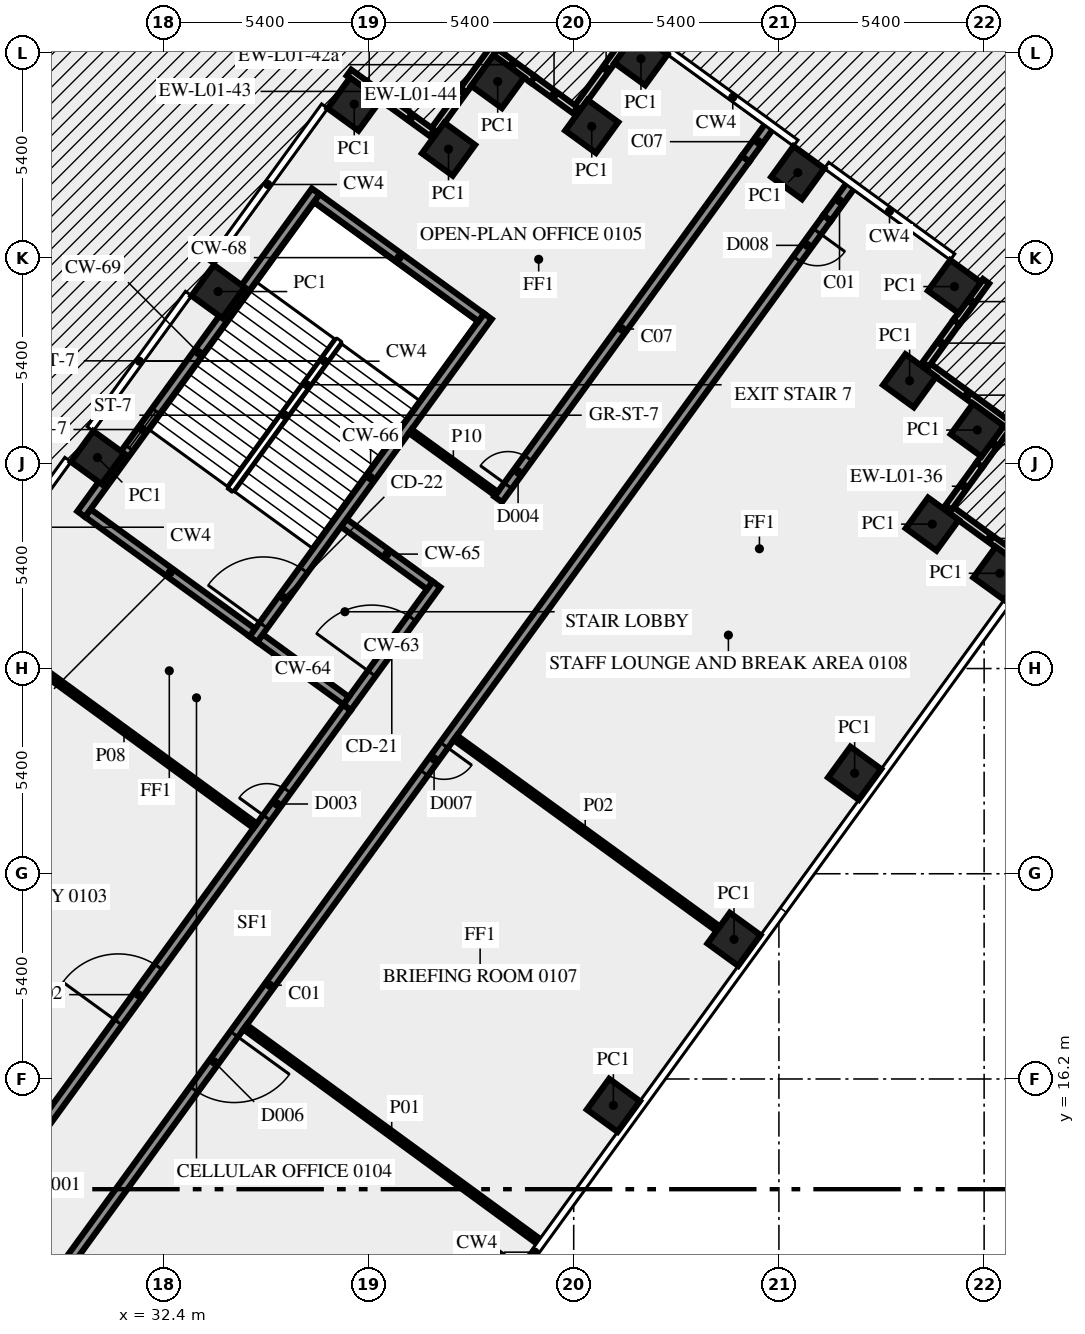
"""IFC4 building model, lengths in metres.
Left out: names, types, materials, properties, quantities, classifications, styles, units other than length and angle.
Written with IfcOpenShell. Run it as: python <this file> out.ifc"""

import sys

from ifc_helpers import new_model, si_unit, direction, frame, frame_2d, origin, origin_2d, place, context, subcontext, project, spatial, rectangle, extrude, element, fill, save


model = new_model("IFC4")
c1 = context("Model", 3, precision=1e-05, world=origin(), true_north=direction((0.0, 1.0)))
c2 = subcontext(c1, "Body", "Model", "MODEL_VIEW")
j1 = project(units=[si_unit("LENGTHUNIT", "METRE"), si_unit("PLANEANGLEUNIT", "RADIAN")], contexts=[c1])
p1 = place(None, origin())
s1 = spatial("IfcSite", under=j1, at=p1, CompositionType="ELEMENT")
p2 = place(p1, origin())
s2 = spatial("IfcBuilding", under=s1, at=p2, CompositionType="ELEMENT")
p3 = place(p2, frame((0.0, 0.0, 6.0)))
s3 = spatial("IfcBuildingStorey", under=s2, at=p3, CompositionType="ELEMENT", Elevation=6.0)
for number, where, z_axis, x_axis in (
    (1, (41.07, 11.137, 0.0), (0.0, 0.0, 1.0), (0.588, 0.809, 0.0)),
    (2, (44.244, 15.506, 0.0), (0.0, 0.0, 1.0), (0.588, 0.809, 0.0)),
    (3, (47.418, 19.875, 0.0), (0.0, 0.0, 1.0), (0.588, 0.809, 0.0)),
    (4, (50.592, 24.243, 0.0), (0.0, 0.0, 1.0), (0.588, 0.809, 0.0)),
    (5, (54.415, 29.505, 0.0), (0.0, 0.0, 1.0), (0.588, 0.809, 0.0)),
    (6, (52.636, 30.8, 0.0), (0.0, 0.0, 1.0), (-0.809, 0.588, 0.0)),
    (7, (53.82, 33.275, 0.0), (0.0, 0.0, 1.0), (-0.809, 0.588, 0.0)),
    (8, (52.039, 34.571, 0.0), (0.0, 0.0, 1.0), (0.588, 0.809, 0.0)),
    (9, (53.22, 37.05, 0.0), (0.0, 0.0, 1.0), (-0.809, 0.588, 0.0)),
    (10, (49.096, 40.047, 0.0), (0.0, 0.0, 1.0), (-0.809, 0.588, 0.0)),
    (11, (44.97, 43.045, 0.0), (0.0, 0.0, 1.0), (-0.809, 0.588, 0.0)),
    (12, (43.675, 41.265, 0.0), (0.0, 0.0, 1.0), (-0.809, 0.588, 0.0)),
    (13, (41.2, 42.445, 0.0), (0.0, 0.0, 1.0), (-0.588, -0.809, 0.0)),
    (14, (39.906, 40.666, 0.0), (0.0, 0.0, 1.0), (-0.588, -0.809, 0.0)),
    (15, (37.425, 41.85, 0.0), (0.0, 0.0, 1.0), (-0.588, -0.809, 0.0)),
    (16, (33.843, 36.919, 0.0), (0.0, 0.0, 1.0), (-0.588, -0.809, 0.0)),
    (17, (30.669, 32.55, 0.0), (0.0, 0.0, 1.0), (-0.588, -0.809, 0.0)),
):
    element("IfcColumn", number, at=place(p3, frame(where, z_axis=z_axis, x_axis=x_axis)), inside=s3, PredefinedType="COLUMN", context=c2, shape_type="SweptSolid", body=[
        extrude(rectangle(XDim=1.0, YDim=1.0, at=origin_2d()), origin(), (0.0, 0.0, 1.0), 5.1),
    ])
p4 = place(p3, frame((55.247, 29.629, 0.0), z_axis=(0.0, 0.0, 1.0), x_axis=(-0.809033161865, 0.587762999008, 0.0)))
e18 = element("IfcWall", 18, at=p4, inside=s3, PredefinedType="SOLIDWALL", context=c2, shape_type="SweptSolid", body=[
    extrude(rectangle(XDim=2.7, YDim=0.2, at=frame_2d((1.35, 0.0))), origin(), (0.0, 0.0, 1.0), 5.1),
])
p5 = place(p3, frame((53.06, 31.233, 0.0), z_axis=(0.0, 0.0, 1.0), x_axis=(0.587776137069, 0.809023616894, 0.0)))
e19 = element("IfcWall", 19, at=p5, inside=s3, PredefinedType="SOLIDWALL", context=c2, shape_type="SweptSolid", body=[
    extrude(rectangle(XDim=1.395, YDim=0.2, at=frame_2d((0.697, 0.0))), origin(), (0.0, 0.0, 1.0), 4.1),
])
p6 = place(p3, frame((53.88, 32.361, 0.0), z_axis=(0.0, 0.0, 1.0), x_axis=(0.587871379726, 0.808954412127, 0.0)))
e20 = element("IfcWall", 20, at=p6, inside=s3, PredefinedType="SOLIDWALL", context=c2, shape_type="SweptSolid", body=[
    extrude(rectangle(XDim=1.305, YDim=0.2, at=frame_2d((0.653, 0.0))), origin(), (0.0, 0.0, 1.0), 5.1),
])
p7 = place(p3, frame((54.65, 33.4, 0.0), z_axis=(0.0, 0.0, 1.0), x_axis=(-0.809033161865, 0.587762999008, 0.0)))
e21 = element("IfcWall", 21, at=p7, inside=s3, PredefinedType="SOLIDWALL", context=c2, shape_type="SweptSolid", body=[
    extrude(rectangle(XDim=2.7, YDim=0.2, at=frame_2d((1.35, 0.0))), origin(), (0.0, 0.0, 1.0), 5.1),
])
p8 = place(p3, frame((52.463, 35.004, 0.0), z_axis=(0.0, 0.0, 1.0), x_axis=(0.587782252522, 0.809019173827, 0.0)))
e22 = element("IfcWall", 22, at=p8, inside=s3, PredefinedType="SOLIDWALL", context=c2, shape_type="SweptSolid", body=[
    extrude(rectangle(XDim=1.379, YDim=0.2, at=frame_2d((0.69, 0.0))), origin(), (0.0, 0.0, 1.0), 4.1),
])
p9 = place(p3, frame((53.273, 36.12, 0.0), z_axis=(0.0, 0.0, 1.0), x_axis=(0.58786388341, 0.808959859686, 0.0)))
e23 = element("IfcWall", 23, at=p9, inside=s3, PredefinedType="SOLIDWALL", context=c2, shape_type="SweptSolid", body=[
    extrude(rectangle(XDim=1.321, YDim=0.2, at=frame_2d((0.66, 0.0))), origin(), (0.0, 0.0, 1.0), 5.1),
])
p10 = place(p3, frame((44.846, 43.875, 0.0), z_axis=(0.0, 0.0, 1.0), x_axis=(-0.587822180636, -0.808990163075, 0.0)))
e24 = element("IfcWall", 24, at=p10, inside=s3, PredefinedType="SOLIDWALL", context=c2, shape_type="SweptSolid", body=[
    extrude(rectangle(XDim=2.7, YDim=0.2, at=frame_2d((1.35, 0.0))), origin(), (0.0, 0.0, 1.0), 5.1),
])
p11 = place(p3, frame((43.242, 41.688, 0.0), z_axis=(0.0, 0.0, 1.0), x_axis=(-0.808926734208, 0.5879094647, 0.0)))
e25 = element("IfcWall", 25, at=p11, inside=s3, PredefinedType="SOLIDWALL", context=c2, shape_type="SweptSolid", body=[
    extrude(rectangle(XDim=1.384, YDim=0.2, at=frame_2d((0.692, 0.0))), origin(), (0.0, 0.0, 1.0), 4.1),
])
p12 = place(p3, frame((42.123, 42.502, 0.0), z_axis=(0.0, 0.0, 1.0), x_axis=(-0.809056865039, 0.587730371117, 0.0)))
e26 = element("IfcWall", 26, at=p12, inside=s3, PredefinedType="SOLIDWALL", context=c2, shape_type="SweptSolid", body=[
    extrude(rectangle(XDim=1.316, YDim=0.2, at=frame_2d((0.658, 0.0))), origin(), (0.0, 0.0, 1.0), 5.1),
])
p13 = place(p3, frame((41.075, 43.278, 0.0), z_axis=(0.0, 0.0, 1.0), x_axis=(-0.587806000234, -0.809001919707, 0.0)))
e27 = element("IfcWall", 27, at=p13, inside=s3, PredefinedType="SOLIDWALL", context=c2, shape_type="SweptSolid", body=[
    extrude(rectangle(XDim=2.7, YDim=0.2, at=frame_2d((1.35, 0.0))), origin(), (0.0, 0.0, 1.0), 5.1),
])
p14 = place(p3, frame((39.471, 41.091, 0.0), z_axis=(0.0, 0.0, 1.0), x_axis=(-0.809002762913, 0.58780483972, 0.0)))
e28 = element("IfcWall", 28, at=p14, inside=s3, PredefinedType="SOLIDWALL", context=c2, shape_type="SweptSolid", body=[
    extrude(rectangle(XDim=1.385, YDim=0.2, at=frame_2d((0.693, 0.0))), origin(), (0.0, 0.0, 1.0), 4.1),
])
p15 = place(p3, frame((38.351, 41.905, 0.0), z_axis=(0.0, 0.0, 1.0), x_axis=(-0.809065186597, 0.587718915671, 0.0)))
e29 = element("IfcWall", 29, at=p15, inside=s3, PredefinedType="SOLIDWALL", context=c2, shape_type="SweptSolid", body=[
    extrude(rectangle(XDim=1.315, YDim=0.2, at=frame_2d((0.657, 0.0))), origin(), (0.0, 0.0, 1.0), 5.1),
])
p16 = place(p3, frame((37.238, 25.98, 0.0), z_axis=(0.0, 0.0, 1.0), x_axis=(0.587772420479, 0.809026317077, 0.0)))
e30 = element("IfcWall", 30, at=p16, inside=s3, PredefinedType="SHEAR", context=c2, shape_type="SweptSolid", body=[
    extrude(rectangle(XDim=4.0, YDim=0.25, at=frame_2d((2.0, 0.0))), origin(), (0.0, 0.0, 1.0), 5.1),
])
p17 = place(p16, frame((1.1, 0.0, 0.0)))
e31 = element("IfcOpeningElement", 31, at=p17, cuts=e30, PredefinedType="OPENING", context=c2, shape_type="SweptSolid", body=[
    extrude(rectangle(XDim=1.8, YDim=2.1, at=frame_2d((0.9, 1.05))), frame((0.0, 0.135, 0.0), z_axis=(0.0, -1.0, 0.0), x_axis=(1.0, 0.0, 0.0)), (0.0, 0.0, 1.0), 0.27),
])
for number, where, z_axis, x_axis in (
    (32, (37.21, 26.154, 0.0), (0.0, 0.0, 1.0), (-0.809, 0.588, 0.0)),
    (33, (39.414, 29.188, 0.0), (0.0, 0.0, 1.0), (-0.809, 0.588, 0.0)),
):
    element("IfcWall", number, at=place(p3, frame(where, z_axis=z_axis, x_axis=x_axis)), inside=s3, PredefinedType="SHEAR", context=c2, shape_type="SweptSolid", body=[
        extrude(rectangle(XDim=2.8, YDim=0.25, at=frame_2d((1.4, 0.0))), origin(), (0.0, 0.0, 1.0), 5.1),
    ])
p18 = place(p3, frame((34.77, 27.772, 0.0), z_axis=(0.0, 0.0, 1.0), x_axis=(0.587795589702, 0.809009483706, 0.0)))
e34 = element("IfcWall", 34, at=p18, inside=s3, PredefinedType="SHEAR", context=c2, shape_type="SweptSolid", body=[
    extrude(rectangle(XDim=10.5, YDim=0.25, at=frame_2d((5.25, 0.0))), origin(), (0.0, 0.0, 1.0), 5.1),
])
p19 = place(p18, frame((0.45, 0.0, 0.0)))
e35 = element("IfcOpeningElement", 35, at=p19, cuts=e34, PredefinedType="OPENING", context=c2, shape_type="SweptSolid", body=[
    extrude(rectangle(XDim=1.8, YDim=2.1, at=frame_2d((0.9, 1.05))), frame((0.0, 0.135, 0.0), z_axis=(0.0, -1.0, 0.0), x_axis=(1.0, 0.0, 0.0)), (0.0, 0.0, 1.0), 0.27),
])
p20 = place(p3, frame((34.742, 27.947, 0.0), z_axis=(0.0, 0.0, 1.0), x_axis=(-0.8089984606, 0.587810760999, 0.0)))
e36 = element("IfcWall", 36, at=p20, inside=s3, PredefinedType="SHEAR", context=c2, shape_type="SweptSolid", body=[
    extrude(rectangle(XDim=5.35, YDim=0.25, at=frame_2d((2.675, 0.0))), origin(), (0.0, 0.0, 1.0), 5.1),
])
p21 = place(p3, frame((40.767, 36.24, 0.0), z_axis=(0.0, 0.0, 1.0), x_axis=(-0.809020161303, 0.587780893365, 0.0)))
e37 = element("IfcWall", 37, at=p21, inside=s3, PredefinedType="SHEAR", context=c2, shape_type="SweptSolid", body=[
    extrude(rectangle(XDim=5.35, YDim=0.25, at=frame_2d((2.675, 0.0))), origin(), (0.0, 0.0, 1.0), 5.1),
])
p22 = place(p3, frame((30.24, 31.064, 0.0), z_axis=(0.0, 0.0, 1.0), x_axis=(0.587795589702, 0.809009483706, 0.0)))
e38 = element("IfcWall", 38, at=p22, inside=s3, PredefinedType="SHEAR", context=c2, shape_type="SweptSolid", body=[
    extrude(rectangle(XDim=10.5, YDim=0.25, at=frame_2d((5.25, 0.0))), origin(), (0.0, 0.0, 1.0), 5.1),
])
p23 = place(p22, frame((2.15, 0.0, 1.0)))
e39 = element("IfcOpeningElement", 39, at=p23, cuts=e38, PredefinedType="OPENING", context=c2, shape_type="SweptSolid", body=[
    extrude(rectangle(XDim=1.2, YDim=1.2, at=frame_2d((0.6, 0.6))), frame((0.0, 0.135, 0.0), z_axis=(0.0, -1.0, 0.0), x_axis=(1.0, 0.0, 0.0)), (0.0, 0.0, 1.0), 0.27),
])
p24 = place(p3, frame((49.869, 38.856, 0.0), z_axis=(0.0, 0.0, 1.0), x_axis=(-0.587784522481, -0.809017524614, 0.0)))
e40 = element("IfcWall", 40, at=p24, inside=s3, PredefinedType="SOLIDWALL", context=c2, shape_type="SweptSolid", body=[
    extrude(rectangle(XDim=49.912, YDim=0.25, at=frame_2d((24.956, 0.0))), origin(), (0.0, 0.0, 1.0), 5.1),
])
p25 = place(p24, frame((17.146, 0.0, 0.0)))
e41 = element("IfcOpeningElement", 41, at=p25, cuts=e40, PredefinedType="OPENING", context=c2, shape_type="SweptSolid", body=[
    extrude(rectangle(XDim=0.9, YDim=2.1, at=frame_2d((0.45, 1.05))), frame((0.0, 0.135, 0.0), z_axis=(0.0, -1.0, 0.0), x_axis=(1.0, 0.0, 0.0)), (0.0, 0.0, 1.0), 0.27),
])
p26 = place(p24, frame((47.629, 0.0, 0.0)))
e42 = element("IfcOpeningElement", 42, at=p26, cuts=e40, PredefinedType="OPENING", context=c2, shape_type="SweptSolid", body=[
    extrude(rectangle(XDim=1.8, YDim=2.1, at=frame_2d((0.9, 1.05))), frame((0.0, 0.135, 0.0), z_axis=(0.0, -1.0, 0.0), x_axis=(1.0, 0.0, 0.0)), (0.0, 0.0, 1.0), 0.27),
])
p27 = place(p24, frame((26.547, 0.0, 0.0)))
e43 = element("IfcOpeningElement", 43, at=p27, cuts=e40, PredefinedType="OPENING", context=c2, shape_type="SweptSolid", body=[
    extrude(rectangle(XDim=1.8, YDim=2.1, at=frame_2d((0.9, 1.05))), frame((0.0, 0.135, 0.0), z_axis=(0.0, -1.0, 0.0), x_axis=(1.0, 0.0, 0.0)), (0.0, 0.0, 1.0), 0.27),
])
p28 = place(p24, frame((0.442, 0.0, 0.0)))
e44 = element("IfcOpeningElement", 44, at=p28, cuts=e40, PredefinedType="OPENING", context=c2, shape_type="SweptSolid", body=[
    extrude(rectangle(XDim=0.9, YDim=2.1, at=frame_2d((0.45, 1.05))), frame((0.0, 0.135, 0.0), z_axis=(0.0, -1.0, 0.0), x_axis=(1.0, 0.0, 0.0)), (0.0, 0.0, 1.0), 0.27),
])
p29 = place(p3, frame((17.545, -1.125, 0.0), z_axis=(0.0, 0.0, 1.0), x_axis=(0.587786323093, 0.809016216391, 0.0)))
e45 = element("IfcWall", 45, at=p29, inside=s3, PredefinedType="SOLIDWALL", context=c2, shape_type="SweptSolid", body=[
    extrude(rectangle(XDim=33.493, YDim=0.25, at=frame_2d((16.747, 0.0))), origin(), (0.0, 0.0, 1.0), 5.1),
])
p30 = place(p29, frame((17.508, 0.0, 0.0)))
e46 = element("IfcOpeningElement", 46, at=p30, cuts=e45, PredefinedType="OPENING", context=c2, shape_type="SweptSolid", body=[
    extrude(rectangle(XDim=0.9, YDim=2.1, at=frame_2d((0.45, 1.05))), frame((0.0, 0.135, 0.0), z_axis=(0.0, -1.0, 0.0), x_axis=(1.0, 0.0, 0.0)), (0.0, 0.0, 1.0), 0.27),
])
p31 = place(p29, frame((29.908, 0.0, 0.0)))
e47 = element("IfcOpeningElement", 47, at=p31, cuts=e45, PredefinedType="OPENING", context=c2, shape_type="SweptSolid", body=[
    extrude(rectangle(XDim=0.9, YDim=2.1, at=frame_2d((0.45, 1.05))), frame((0.0, 0.135, 0.0), z_axis=(0.0, -1.0, 0.0), x_axis=(1.0, 0.0, 0.0)), (0.0, 0.0, 1.0), 0.27),
])
p32 = place(p29, frame((23.258, 0.0, 0.0)))
e48 = element("IfcOpeningElement", 48, at=p32, cuts=e45, PredefinedType="OPENING", context=c2, shape_type="SweptSolid", body=[
    extrude(rectangle(XDim=1.8, YDim=2.1, at=frame_2d((0.9, 1.05))), frame((0.0, 0.135, 0.0), z_axis=(0.0, -1.0, 0.0), x_axis=(1.0, 0.0, 0.0)), (0.0, 0.0, 1.0), 0.27),
])
p33 = place(p3, frame((41.213, 31.451, 0.0), z_axis=(0.0, 0.0, 1.0), x_axis=(0.587773291021, 0.809025684612, 0.0)))
e49 = element("IfcWall", 49, at=p33, inside=s3, PredefinedType="SOLIDWALL", context=c2, shape_type="SweptSolid", body=[
    extrude(rectangle(XDim=11.079, YDim=0.25, at=frame_2d((5.539, 0.0))), origin(), (0.0, 0.0, 1.0), 5.1),
])
p34 = place(p33, frame((0.441, 0.0, 0.0)))
e50 = element("IfcOpeningElement", 50, at=p34, cuts=e49, PredefinedType="OPENING", context=c2, shape_type="SweptSolid", body=[
    extrude(rectangle(XDim=0.9, YDim=2.1, at=frame_2d((0.45, 1.05))), frame((0.0, 0.135, 0.0), z_axis=(0.0, -1.0, 0.0), x_axis=(1.0, 0.0, 0.0)), (0.0, 0.0, 1.0), 0.27),
])
p35 = place(p3, frame((34.554, 17.565, 0.0), z_axis=(0.0, 0.0, 1.0), x_axis=(0.807645841498, -0.589667868135, 0.0)))
e51 = element("IfcWall", 51, at=p35, inside=s3, PredefinedType="PARTITIONING", context=c2, shape_type="SweptSolid", body=[
    extrude(rectangle(XDim=9.551, YDim=0.15, at=frame_2d((4.775, 0.0))), origin(), (0.0, 0.0, 1.0), 4.1),
])
p36 = place(p3, frame((46.921, 20.211, 0.0), z_axis=(0.0, 0.0, 1.0), x_axis=(-0.808992136407, 0.587819464829, 0.0)))
e52 = element("IfcWall", 52, at=p36, inside=s3, PredefinedType="PARTITIONING", context=c2, shape_type="SweptSolid", body=[
    extrude(rectangle(XDim=8.45, YDim=0.15, at=frame_2d((4.225, 0.0))), origin(), (0.0, 0.0, 1.0), 5.1),
])
p37 = place(p3, frame((27.915, 27.901, 0.0), z_axis=(0.0, 0.0, 1.0), x_axis=(0.80766005508, -0.589648399836, 0.0)))
e53 = element("IfcWall", 53, at=p37, inside=s3, PredefinedType="PARTITIONING", context=c2, shape_type="SweptSolid", body=[
    extrude(rectangle(XDim=8.547, YDim=0.15, at=frame_2d((4.273, 0.0))), origin(), (0.0, 0.0, 1.0), 5.1),
])
p38 = place(p3, frame((38.9, 33.245, 0.0), z_axis=(0.0, 0.0, 1.0), x_axis=(0.809090262332, -0.587684394381, 0.0)))
e54 = element("IfcWall", 54, at=p38, inside=s3, PredefinedType="PARTITIONING", context=c2, shape_type="SweptSolid", body=[
    extrude(rectangle(XDim=2.801, YDim=0.12, at=frame_2d((1.4, 0.0))), origin(), (0.0, 0.0, 1.0), 5.1),
])
p39 = place(p3, frame((49.869, 38.856, 0.0), z_axis=(0.0, 0.0, 1.0), x_axis=(0.587674273289, 0.809097613712, 0.0)))
e55 = element("IfcWall", 55, at=p39, inside=s3, PredefinedType="SOLIDWALL", context=c2, shape_type="SweptSolid", body=[
    extrude(rectangle(XDim=1.109, YDim=0.25, at=frame_2d((0.555, 0.0))), origin(), (0.0, 0.0, 1.0), 4.1),
])
p40 = place(p3, frame((47.725, 40.414, 0.0), z_axis=(0.0, 0.0, 1.0), x_axis=(0.587883639643, 0.808945502639, 0.0)))
e56 = element("IfcWall", 56, at=p40, inside=s3, PredefinedType="SOLIDWALL", context=c2, shape_type="SweptSolid", body=[
    extrude(rectangle(XDim=1.109, YDim=0.25, at=frame_2d((0.554, 0.0))), origin(), (0.0, 0.0, 1.0), 4.1),
])
p41 = place(p17, origin())
e57 = element("IfcDoor", 57, at=p41, inside=s3, OperationType="DOUBLE_DOOR_SINGLE_SWING", PredefinedType="DOOR", context=c2, shape_type="SweptSolid", body=[
    extrude(rectangle(XDim=1.8, YDim=2.1, at=frame_2d((0.9, 1.05))), frame((0.0, 0.025, 0.0), z_axis=(0.0, -1.0, 0.0), x_axis=(1.0, 0.0, 0.0)), (0.0, 0.0, 1.0), 0.05),
])
fill(e31, e57)
p42 = place(p19, origin())
e58 = element("IfcDoor", 58, at=p42, inside=s3, OperationType="DOUBLE_DOOR_SINGLE_SWING", PredefinedType="DOOR", context=c2, shape_type="SweptSolid", body=[
    extrude(rectangle(XDim=1.8, YDim=2.1, at=frame_2d((0.9, 1.05))), frame((0.0, 0.025, 0.0), z_axis=(0.0, -1.0, 0.0), x_axis=(1.0, 0.0, 0.0)), (0.0, 0.0, 1.0), 0.05),
])
fill(e35, e58)
p43 = place(p23, origin())
e59 = element("IfcWindow", 59, at=p43, inside=s3, PartitioningType="SINGLE_PANEL", PredefinedType="WINDOW", context=c2, shape_type="SweptSolid", body=[
    extrude(rectangle(XDim=1.2, YDim=1.2, at=frame_2d((0.6, 0.6))), frame((0.0, 0.03, 0.0), z_axis=(0.0, -1.0, 0.0), x_axis=(1.0, 0.0, 0.0)), (0.0, 0.0, 1.0), 0.06),
])
fill(e39, e59)
p44 = place(p25, origin())
e60 = element("IfcDoor", 60, at=p44, inside=s3, OperationType="SINGLE_SWING_LEFT", PredefinedType="DOOR", context=c2, shape_type="SweptSolid", body=[
    extrude(rectangle(XDim=0.9, YDim=2.1, at=frame_2d((0.45, 1.05))), frame((0.0, 0.025, 0.0), z_axis=(0.0, -1.0, 0.0), x_axis=(1.0, 0.0, 0.0)), (0.0, 0.0, 1.0), 0.05),
])
fill(e41, e60)
p45 = place(p31, origin())
e61 = element("IfcDoor", 61, at=p45, inside=s3, OperationType="SINGLE_SWING_LEFT", PredefinedType="DOOR", context=c2, shape_type="SweptSolid", body=[
    extrude(rectangle(XDim=0.9, YDim=2.1, at=frame_2d((0.45, 1.05))), frame((0.0, 0.025, 0.0), z_axis=(0.0, -1.0, 0.0), x_axis=(1.0, 0.0, 0.0)), (0.0, 0.0, 1.0), 0.05),
])
fill(e47, e61)
p46 = place(p34, origin())
e62 = element("IfcDoor", 62, at=p46, inside=s3, OperationType="SINGLE_SWING_LEFT", PredefinedType="DOOR", context=c2, shape_type="SweptSolid", body=[
    extrude(rectangle(XDim=0.9, YDim=2.1, at=frame_2d((0.45, 1.05))), frame((0.0, 0.025, 0.0), z_axis=(0.0, -1.0, 0.0), x_axis=(1.0, 0.0, 0.0)), (0.0, 0.0, 1.0), 0.05),
])
fill(e50, e62)
p47 = place(p27, origin())
e63 = element("IfcDoor", 63, at=p47, inside=s3, OperationType="DOUBLE_DOOR_SINGLE_SWING", PredefinedType="DOOR", context=c2, shape_type="SweptSolid", body=[
    extrude(rectangle(XDim=1.8, YDim=2.1, at=frame_2d((0.9, 1.05))), frame((0.0, 0.025, 0.0), z_axis=(0.0, -1.0, 0.0), x_axis=(1.0, 0.0, 0.0)), (0.0, 0.0, 1.0), 0.05),
])
fill(e43, e63)
p48 = place(p32, origin())
e64 = element("IfcDoor", 64, at=p48, inside=s3, OperationType="DOUBLE_DOOR_SINGLE_SWING", PredefinedType="DOOR", context=c2, shape_type="SweptSolid", body=[
    extrude(rectangle(XDim=1.8, YDim=2.1, at=frame_2d((0.9, 1.05))), frame((0.0, 0.025, 0.0), z_axis=(0.0, -1.0, 0.0), x_axis=(1.0, 0.0, 0.0)), (0.0, 0.0, 1.0), 0.05),
])
fill(e48, e64)
p49 = place(p28, origin())
e65 = element("IfcDoor", 65, at=p49, inside=s3, OperationType="SINGLE_SWING_LEFT", PredefinedType="DOOR", context=c2, shape_type="SweptSolid", body=[
    extrude(rectangle(XDim=0.9, YDim=2.1, at=frame_2d((0.45, 1.05))), frame((0.0, 0.025, 0.0), z_axis=(0.0, -1.0, 0.0), x_axis=(1.0, 0.0, 0.0)), (0.0, 0.0, 1.0), 0.05),
])
fill(e44, e65)
save(model, sys.argv[1])
